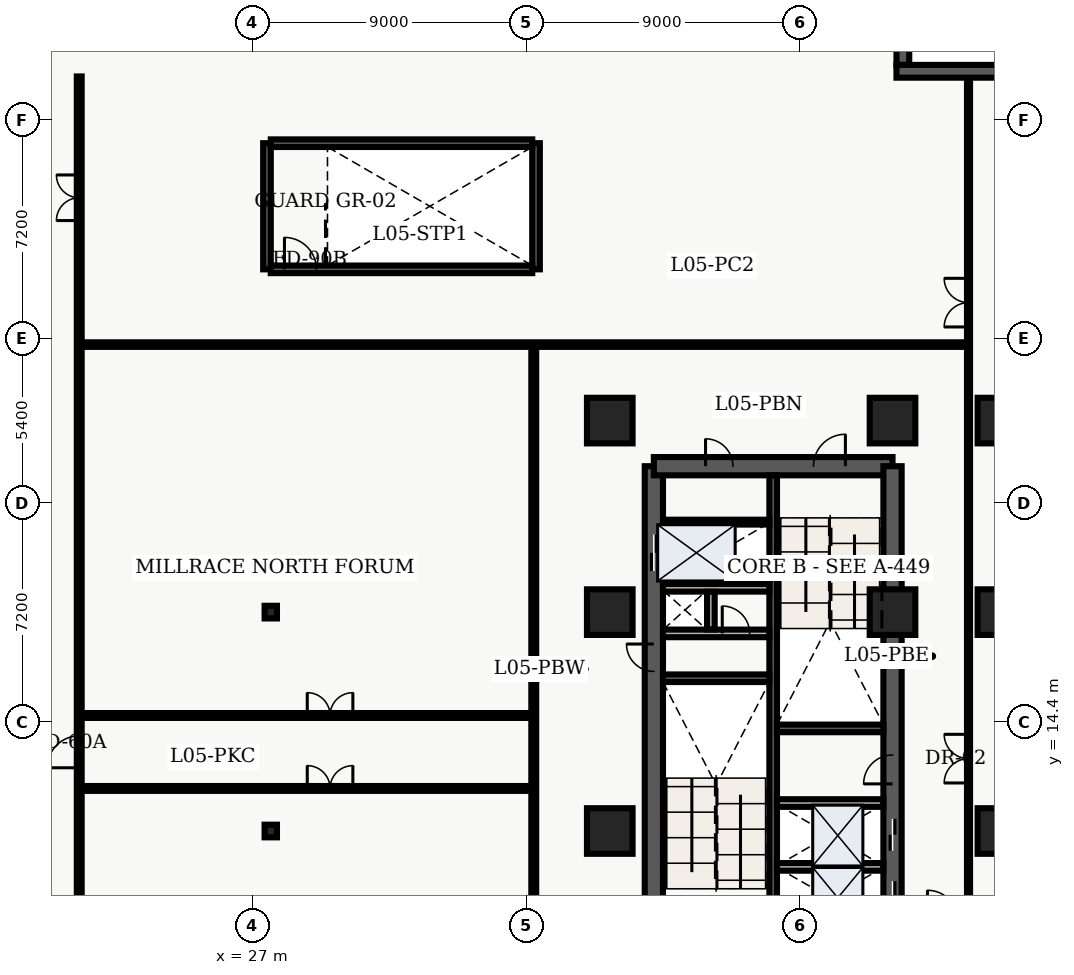
"""IFC4 building model, lengths in metres.
Left out: names, types, materials, properties, quantities, classifications, styles, units other than length and angle.
Written with IfcOpenShell. Run it as: python <this file> out.ifc"""

import sys

from ifc_helpers import new_model, entity, si_unit, converted_unit, direction, frame, origin_with_axes, origin_2d_with_axis, place, context, subcontext, project, spatial, polyline, rectangle, i_section, outline, extrude, element, fill, save


model = new_model("IFC4")
c1 = context("Model", 3, precision=1e-05, world=origin_with_axes(), true_north=direction((0.0, 1.0)))
c2 = subcontext(c1, "Body", "Model", "MODEL_VIEW")
j1 = project(units=[si_unit("LENGTHUNIT", "METRE"), converted_unit("PLANEANGLEUNIT", "DEGREE", entity("IfcPlaneAngleMeasure", 0.017), si_unit("PLANEANGLEUNIT", "RADIAN"), dimensions=[0, 0, 0, 0, 0, 0, 0])], contexts=[c1])
p1 = place(None, origin_with_axes())
s1 = spatial("IfcSite", under=j1, at=p1, CompositionType="ELEMENT")
p2 = place(p1, origin_with_axes())
s2 = spatial("IfcBuilding", under=s1, at=p2, CompositionType="ELEMENT")
p3 = place(p2, frame((0.0, 0.0, 24.3), z_axis=(0.0, 0.0, 1.0), x_axis=(1.0, 0.0, 0.0)))
s3 = spatial("IfcBuildingStorey", under=s2, at=p3, CompositionType="ELEMENT", Elevation=24.3)
p4 = place(p3, frame((40.2, 7.2, 0.0), z_axis=(0.0, 0.0, 1.0), x_axis=(0.0, 1.0, 0.0)))
e1 = element("IfcWall", 1, at=p4, inside=s3, PredefinedType="SHEAR", context=c2, shape_type="SweptSolid", body=[
    extrude(outline(polyline([(0.0, -0.3), (15.6, -0.3), (15.6, 0.3), (0.0, 0.3), (0.0, -0.3)])), origin_with_axes(), (0.0, 0.0, 1.0), 4.2),
])
p5 = place(p4, frame((12.75, 0.0, 0.0), z_axis=(0.0, 0.0, 1.0), x_axis=(1.0, 0.0, 0.0)))
e2 = element("IfcOpeningElement", 2, at=p5, cuts=e1, PredefinedType="OPENING", context=c2, shape_type="SweptSolid", body=[
    extrude(rectangle(XDim=1.2, YDim=0.62, at=origin_2d_with_axis()), origin_with_axes(), (0.0, 0.0, 1.0), 2.15),
])
p6 = place(p4, frame((9.3, 0.0, 0.0), z_axis=(0.0, 0.0, 1.0), x_axis=(1.0, 0.0, 0.0)))
e3 = element("IfcOpeningElement", 3, at=p6, cuts=e1, PredefinedType="OPENING", context=c2, shape_type="SweptSolid", body=[
    extrude(rectangle(XDim=0.9, YDim=0.62, at=origin_2d_with_axis()), origin_with_axes(), (0.0, 0.0, 1.0), 2.15),
])
p7 = place(p3, frame((40.2, 22.8, 0.0), z_axis=(0.0, 0.0, 1.0), x_axis=(1.0, 0.0, 0.0)))
e4 = element("IfcWall", 4, at=p7, inside=s3, PredefinedType="SHEAR", context=c2, shape_type="SweptSolid", body=[
    extrude(outline(polyline([(0.0, -0.3), (7.85, -0.3), (7.85, 0.3), (0.0, 0.3), (0.0, -0.3)])), origin_with_axes(), (0.0, 0.0, 1.0), 4.2),
])
p8 = place(p7, frame((5.775, 0.0, 0.0), z_axis=(0.0, 0.0, 1.0), x_axis=(1.0, 0.0, 0.0)))
e5 = element("IfcOpeningElement", 5, at=p8, cuts=e4, PredefinedType="OPENING", context=c2, shape_type="SweptSolid", body=[
    extrude(rectangle(XDim=1.05, YDim=0.62, at=origin_2d_with_axis()), origin_with_axes(), (0.0, 0.0, 1.0), 2.15),
])
p9 = place(p7, frame((2.15, 0.0, 0.0), z_axis=(0.0, 0.0, 1.0), x_axis=(1.0, 0.0, 0.0)))
e6 = element("IfcOpeningElement", 6, at=p9, cuts=e4, PredefinedType="OPENING", context=c2, shape_type="SweptSolid", body=[
    extrude(rectangle(XDim=0.9, YDim=0.62, at=origin_2d_with_axis()), origin_with_axes(), (0.0, 0.0, 1.0), 2.15),
])
p10 = place(p3, frame((48.05, 7.2, 0.0), z_axis=(0.0, 0.0, 1.0), x_axis=(0.0, 1.0, 0.0)))
e7 = element("IfcWall", 7, at=p10, inside=s3, PredefinedType="SHEAR", context=c2, shape_type="SweptSolid", body=[
    extrude(outline(polyline([(0.0, -0.3), (15.6, -0.3), (15.6, 0.3), (0.0, 0.3), (0.0, -0.3)])), origin_with_axes(), (0.0, 0.0, 1.0), 4.2),
])
p11 = place(p10, frame((1.425, 0.0, 0.0), z_axis=(0.0, 0.0, 1.0), x_axis=(1.0, 0.0, 0.0)))
e8 = element("IfcOpeningElement", 8, at=p11, cuts=e7, PredefinedType="OPENING", context=c2, shape_type="SweptSolid", body=[
    extrude(rectangle(XDim=1.05, YDim=0.62, at=origin_2d_with_axis()), origin_with_axes(), (0.0, 0.0, 1.0), 2.15),
])
p12 = place(p10, frame((3.475, 0.0, 0.0), z_axis=(0.0, 0.0, 1.0), x_axis=(1.0, 0.0, 0.0)))
e9 = element("IfcOpeningElement", 9, at=p12, cuts=e7, PredefinedType="OPENING", context=c2, shape_type="SweptSolid", body=[
    extrude(rectangle(XDim=1.05, YDim=0.62, at=origin_2d_with_axis()), origin_with_axes(), (0.0, 0.0, 1.0), 2.15),
])
p13 = place(p10, frame((5.625, 0.0, 0.0), z_axis=(0.0, 0.0, 1.0), x_axis=(1.0, 0.0, 0.0)))
e10 = element("IfcOpeningElement", 10, at=p13, cuts=e7, PredefinedType="OPENING", context=c2, shape_type="SweptSolid", body=[
    extrude(rectangle(XDim=0.95, YDim=0.62, at=origin_2d_with_axis()), origin_with_axes(), (0.0, 0.0, 1.0), 2.15),
])
p14 = place(p3, frame((44.125, 7.5, 0.0), z_axis=(0.0, 0.0, 1.0), x_axis=(0.0, 1.0, 0.0)))
e11 = element("IfcWall", 11, at=p14, inside=s3, PredefinedType="SHEAR", context=c2, shape_type="SweptSolid", body=[
    extrude(outline(polyline([(0.0, -0.125), (15.0, -0.125), (15.0, 0.125), (0.0, 0.125), (0.0, -0.125)])), origin_with_axes(), (0.0, 0.0, 1.0), 4.2),
])
for number, where, z_axis, x_axis in (
    (12, (40.5, 15.825, 0.0), (0.0, 0.0, 1.0), (1.0, 0.0, 0.0)),
    (13, (44.25, 14.175, 0.0), (0.0, 0.0, 1.0), (1.0, 0.0, 0.0)),
):
    element("IfcWall", number, at=place(p3, frame(where, z_axis=z_axis, x_axis=x_axis)), inside=s3, PredefinedType="SHEAR", context=c2, shape_type="SweptSolid", body=[
        extrude(outline(polyline([(0.0, -0.125), (3.5, -0.125), (3.5, 0.125), (0.0, 0.125), (0.0, -0.125)])), origin_with_axes(), (0.0, 0.0, 1.0), 4.2),
    ])
p15 = place(p3, frame((40.5, 17.3, 0.0), z_axis=(0.0, 0.0, 1.0), x_axis=(1.0, 0.0, 0.0)))
e14 = element("IfcWall", 14, at=p15, inside=s3, PredefinedType="SOLIDWALL", context=c2, shape_type="SweptSolid", body=[
    extrude(outline(polyline([(0.0, -0.125), (3.5, -0.125), (3.5, 0.125), (0.0, 0.125), (0.0, -0.125)])), origin_with_axes(), (0.0, 0.0, 1.0), 3.24),
])
p16 = place(p15, frame((2.4, 0.0, 0.0), z_axis=(0.0, 0.0, 1.0), x_axis=(1.0, 0.0, 0.0)))
e15 = element("IfcOpeningElement", 15, at=p16, cuts=e14, PredefinedType="OPENING", context=c2, shape_type="SweptSolid", body=[
    extrude(rectangle(XDim=0.9, YDim=0.27, at=origin_2d_with_axis()), origin_with_axes(), (0.0, 0.0, 1.0), 2.15),
])
p17 = place(p3, frame((40.5, 18.8, 0.0), z_axis=(0.0, 0.0, 1.0), x_axis=(1.0, 0.0, 0.0)))
e16 = element("IfcWall", 16, at=p17, inside=s3, PredefinedType="SOLIDWALL", context=c2, shape_type="SweptSolid", body=[
    extrude(outline(polyline([(0.0, -0.125), (3.5, -0.125), (3.5, 0.125), (0.0, 0.125), (0.0, -0.125)])), origin_with_axes(), (0.0, 0.0, 1.0), 3.24),
])
p18 = place(p3, frame((42.075, 17.43, 0.0), z_axis=(0.0, 0.0, 1.0), x_axis=(0.0, 1.0, 0.0)))
e17 = element("IfcWall", 17, at=p18, inside=s3, PredefinedType="SOLIDWALL", context=c2, shape_type="SweptSolid", body=[
    extrude(outline(polyline([(0.0, -0.125), (1.24, -0.125), (1.24, 0.125), (0.0, 0.125), (0.0, -0.125)])), origin_with_axes(), (0.0, 0.0, 1.0), 3.24),
])
for number, where, z_axis, x_axis in (
    (18, (27.475, 29.275, 0.0), (0.0, 0.0, 1.0), (0.0, 1.0, 0.0)),
    (19, (36.325, 29.275, 0.0), (0.0, 0.0, 1.0), (0.0, 1.0, 0.0)),
):
    element("IfcWall", number, at=place(p3, frame(where, z_axis=z_axis, x_axis=x_axis)), inside=s3, PredefinedType="SHEAR", context=c2, shape_type="SweptSolid", body=[
        extrude(outline(polyline([(0.0, -0.125), (4.15, -0.125), (4.15, 0.125), (0.0, 0.125), (0.0, -0.125)])), origin_with_axes(), (0.0, 0.0, 1.0), 4.2),
    ])
p19 = place(p3, frame((27.6, 29.275, 0.0), z_axis=(0.0, 0.0, 1.0), x_axis=(1.0, 0.0, 0.0)))
e20 = element("IfcWall", 20, at=p19, inside=s3, PredefinedType="SHEAR", context=c2, shape_type="SweptSolid", body=[
    extrude(outline(polyline([(0.0, -0.125), (8.6, -0.125), (8.6, 0.125), (0.0, 0.125), (0.0, -0.125)])), origin_with_axes(), (0.0, 0.0, 1.0), 4.2),
])
p20 = place(p19, frame((0.975, 0.0, 0.0), z_axis=(0.0, 0.0, 1.0), x_axis=(1.0, 0.0, 0.0)))
e21 = element("IfcOpeningElement", 21, at=p20, cuts=e20, PredefinedType="OPENING", context=c2, shape_type="SweptSolid", body=[
    extrude(rectangle(XDim=1.05, YDim=0.27, at=origin_2d_with_axis()), origin_with_axes(), (0.0, 0.0, 1.0), 2.15),
])
p21 = place(p3, frame((27.6, 33.425, 0.0), z_axis=(0.0, 0.0, 1.0), x_axis=(1.0, 0.0, 0.0)))
e22 = element("IfcWall", 22, at=p21, inside=s3, PredefinedType="SHEAR", context=c2, shape_type="SweptSolid", body=[
    extrude(outline(polyline([(0.0, -0.125), (8.6, -0.125), (8.6, 0.125), (0.0, 0.125), (0.0, -0.125)])), origin_with_axes(), (0.0, 0.0, 1.0), 4.2),
])
for number, where, z_axis, x_axis in (
    (23, (27.6, 10.8, 0.0), (0.0, 0.0, 1.0), (1.0, 0.0, 0.0)),
    (24, (27.6, 18.0, 0.0), (0.0, 0.0, 1.0), (1.0, 0.0, 0.0)),
):
    element("IfcColumn", number, at=place(p3, frame(where, z_axis=z_axis, x_axis=x_axis)), inside=s3, PredefinedType="COLUMN", context=c2, shape_type="SweptSolid", body=[
        extrude(i_section(OverallWidth=0.406, OverallDepth=0.416, WebThickness=0.03, FlangeThickness=0.048, FilletRadius=0.022, at=origin_2d_with_axis()), origin_with_axes(), (0.0, 0.0, 1.0), 4.5),
    ])
for number, where, z_axis, x_axis in (
    (25, (38.75, 10.8, 0.0), (0.0, 0.0, 1.0), (1.0, 0.0, 0.0)),
    (26, (38.75, 18.0, 0.0), (0.0, 0.0, 1.0), (1.0, 0.0, 0.0)),
    (27, (38.75, 24.3, 0.0), (0.0, 0.0, 1.0), (1.0, 0.0, 0.0)),
    (28, (48.05, 18.0, 0.0), (0.0, 0.0, 1.0), (1.0, 0.0, 0.0)),
    (29, (48.05, 24.3, 0.0), (0.0, 0.0, 1.0), (1.0, 0.0, 0.0)),
    (30, (51.6, 10.8, 0.0), (0.0, 0.0, 1.0), (1.0, 0.0, 0.0)),
    (31, (51.6, 18.0, 0.0), (0.0, 0.0, 1.0), (1.0, 0.0, 0.0)),
    (32, (51.6, 24.3, 0.0), (0.0, 0.0, 1.0), (1.0, 0.0, 0.0)),
):
    element("IfcColumn", number, at=place(p3, frame(where, z_axis=z_axis, x_axis=x_axis)), inside=s3, PredefinedType="COLUMN", context=c2, shape_type="SweptSolid", body=[
        extrude(rectangle(XDim=1.5, YDim=1.5, at=origin_2d_with_axis()), origin_with_axes(), (0.0, 0.0, 1.0), 4.5),
    ])
p22 = place(p3, frame((40.5, 20.96, 0.0), z_axis=(0.0, 0.0, 1.0), x_axis=(1.0, 0.0, 0.0)))
e33 = element("IfcWall", 33, at=p22, inside=s3, PredefinedType="PARTITIONING", context=c2, shape_type="SweptSolid", body=[
    extrude(outline(polyline([(0.0, -0.08), (3.5, -0.08), (3.5, 0.08), (0.0, 0.08), (0.0, -0.08)])), origin_with_axes(), (0.0, 0.0, 1.0), 3.2),
])
for number, where, z_axis, x_axis in (
    (34, (44.25, 9.62, 0.0), (0.0, 0.0, 1.0), (1.0, 0.0, 0.0)),
    (35, (44.25, 11.72, 0.0), (0.0, 0.0, 1.0), (1.0, 0.0, 0.0)),
):
    element("IfcWall", number, at=place(p3, frame(where, z_axis=z_axis, x_axis=x_axis)), inside=s3, PredefinedType="SOLIDWALL", context=c2, shape_type="SweptSolid", body=[
        extrude(outline(polyline([(0.0, -0.125), (3.5, -0.125), (3.5, 0.125), (0.0, 0.125), (0.0, -0.125)])), origin_with_axes(), (0.0, 0.0, 1.0), 3.2),
    ])
p23 = place(p3, frame((21.3, 0.38, 0.0), z_axis=(0.0, 0.0, 1.0), x_axis=(0.0, 1.0, 0.0)))
e36 = element("IfcWall", 36, at=p23, inside=s3, PredefinedType="PARTITIONING", context=c2, shape_type="SweptSolid", body=[
    extrude(outline(polyline([(0.0, -0.08), (35.24, -0.08), (35.24, 0.08), (0.0, 0.08), (0.0, -0.08)])), origin_with_axes(), (0.0, 0.0, 1.0), 3.2),
])
p24 = place(p23, frame((13.025, 0.0, 0.0), z_axis=(0.0, 0.0, 1.0), x_axis=(1.0, 0.0, 0.0)))
e37 = element("IfcOpeningElement", 37, at=p24, cuts=e36, PredefinedType="OPENING", context=c2, shape_type="SweptSolid", body=[
    extrude(rectangle(XDim=1.05, YDim=0.18, at=origin_2d_with_axis()), origin_with_axes(), (0.0, 0.0, 1.0), 2.15),
])
p25 = place(p23, frame((31.25, 0.0, 0.0), z_axis=(0.0, 0.0, 1.0), x_axis=(1.0, 0.0, 0.0)))
e38 = element("IfcOpeningElement", 38, at=p25, cuts=e36, PredefinedType="OPENING", context=c2, shape_type="SweptSolid", body=[
    extrude(rectangle(XDim=1.5, YDim=0.18, at=origin_2d_with_axis()), origin_with_axes(), (0.0, 0.0, 1.0), 2.2),
])
p26 = place(p3, frame((21.3, 12.2, 0.0), z_axis=(0.0, 0.0, 1.0), x_axis=(1.0, 0.0, 0.0)))
e39 = element("IfcWall", 39, at=p26, inside=s3, PredefinedType="PARTITIONING", context=c2, shape_type="SweptSolid", body=[
    extrude(outline(polyline([(0.0, -0.08), (14.95, -0.08), (14.95, 0.08), (0.0, 0.08), (0.0, -0.08)])), origin_with_axes(), (0.0, 0.0, 1.0), 3.2),
])
p27 = place(p26, frame((8.25, 0.0, 0.0), z_axis=(0.0, 0.0, 1.0), x_axis=(1.0, 0.0, 0.0)))
e40 = element("IfcOpeningElement", 40, at=p27, cuts=e39, PredefinedType="OPENING", context=c2, shape_type="SweptSolid", body=[
    extrude(rectangle(XDim=1.5, YDim=0.18, at=origin_2d_with_axis()), origin_with_axes(), (0.0, 0.0, 1.0), 2.2),
])
p28 = place(p3, frame((21.3, 14.6, 0.0), z_axis=(0.0, 0.0, 1.0), x_axis=(1.0, 0.0, 0.0)))
e41 = element("IfcWall", 41, at=p28, inside=s3, PredefinedType="PARTITIONING", context=c2, shape_type="SweptSolid", body=[
    extrude(outline(polyline([(0.0, -0.08), (14.95, -0.08), (14.95, 0.08), (0.0, 0.08), (0.0, -0.08)])), origin_with_axes(), (0.0, 0.0, 1.0), 3.2),
])
p29 = place(p28, frame((8.25, 0.0, 0.0), z_axis=(0.0, 0.0, 1.0), x_axis=(1.0, 0.0, 0.0)))
e42 = element("IfcOpeningElement", 42, at=p29, cuts=e41, PredefinedType="OPENING", context=c2, shape_type="SweptSolid", body=[
    extrude(rectangle(XDim=1.5, YDim=0.18, at=origin_2d_with_axis()), origin_with_axes(), (0.0, 0.0, 1.0), 2.2),
])
p30 = place(p3, frame((36.25, 4.3, 0.0), z_axis=(0.0, 0.0, 1.0), x_axis=(0.0, 1.0, 0.0)))
e43 = element("IfcWall", 43, at=p30, inside=s3, PredefinedType="PARTITIONING", context=c2, shape_type="SweptSolid", body=[
    extrude(outline(polyline([(0.0, -0.08), (22.5, -0.08), (22.5, 0.08), (0.0, 0.08), (0.0, -0.08)])), origin_with_axes(), (0.0, 0.0, 1.0), 3.2),
])
p31 = place(p3, frame((50.55, 0.38, 0.0), z_axis=(0.0, 0.0, 1.0), x_axis=(0.0, 1.0, 0.0)))
e44 = element("IfcWall", 44, at=p31, inside=s3, PredefinedType="PARTITIONING", context=c2, shape_type="SweptSolid", body=[
    extrude(outline(polyline([(0.0, -0.05), (35.24, -0.05), (35.24, 0.05), (0.0, 0.05), (0.0, -0.05)])), origin_with_axes(), (0.0, 0.0, 1.0), 3.2),
])
p32 = place(p31, frame((12.8, 0.0, 0.0), z_axis=(0.0, 0.0, 1.0), x_axis=(1.0, 0.0, 0.0)))
e45 = element("IfcOpeningElement", 45, at=p32, cuts=e44, PredefinedType="OPENING", context=c2, shape_type="SweptSolid", body=[
    extrude(rectangle(XDim=1.6, YDim=0.12, at=origin_2d_with_axis()), origin_with_axes(), (0.0, 0.0, 1.0), 2.2),
])
p33 = place(p31, frame((27.8, 0.0, 0.0), z_axis=(0.0, 0.0, 1.0), x_axis=(1.0, 0.0, 0.0)))
e46 = element("IfcOpeningElement", 46, at=p33, cuts=e44, PredefinedType="OPENING", context=c2, shape_type="SweptSolid", body=[
    extrude(rectangle(XDim=1.6, YDim=0.12, at=origin_2d_with_axis()), origin_with_axes(), (0.0, 0.0, 1.0), 2.2),
])
p34 = place(p3, frame((21.3, 26.8, 0.0), z_axis=(0.0, 0.0, 1.0), x_axis=(1.0, 0.0, 0.0)))
e47 = element("IfcWall", 47, at=p34, inside=s3, PredefinedType="PARTITIONING", context=c2, shape_type="SweptSolid", body=[
    extrude(outline(polyline([(0.0, -0.075), (29.25, -0.075), (29.25, 0.075), (0.0, 0.075), (0.0, -0.075)])), origin_with_axes(), (0.0, 0.0, 1.0), 3.2),
])
p35 = place(p3, frame((48.39, 39.3, 0.0), z_axis=(0.0, 0.0, 1.0), x_axis=(0.0, -1.0, 0.0)))
e48 = element("IfcWall", 48, at=p35, inside=s3, PredefinedType="SOLIDWALL", context=c2, shape_type="SweptSolid", body=[
    extrude(outline(polyline([(0.0, -0.21), (3.3, -0.21), (3.3, 0.21), (0.0, 0.21), (0.0, -0.21)])), origin_with_axes(), (0.0, 0.0, 1.0), 4.2),
])
p36 = place(p3, frame((48.18, 35.79, 0.0), z_axis=(0.0, 0.0, 1.0), x_axis=(1.0, 0.0, 0.0)))
e49 = element("IfcWall", 49, at=p36, inside=s3, PredefinedType="SOLIDWALL", context=c2, shape_type="SweptSolid", body=[
    extrude(outline(polyline([(0.0, -0.21), (5.52, -0.21), (5.52, 0.21), (0.0, 0.21), (0.0, -0.21)])), origin_with_axes(), (0.0, 0.0, 1.0), 4.2),
])
p37 = place(p10, frame((1.425, 0.0, 0.0), z_axis=(0.0, 0.0, 1.0), x_axis=(1.0, 0.0, 0.0)))
e50 = element("IfcDoor", 50, at=p37, inside=s3, OperationType="SLIDING_TO_LEFT", PredefinedType="DOOR", context=c2, shape_type="SweptSolid", body=[
    extrude(rectangle(XDim=1.05, YDim=0.09, at=origin_2d_with_axis()), origin_with_axes(), (0.0, 0.0, 1.0), 2.15),
])
fill(e8, e50)
p38 = place(p10, frame((3.475, 0.0, 0.0), z_axis=(0.0, 0.0, 1.0), x_axis=(1.0, 0.0, 0.0)))
e51 = element("IfcDoor", 51, at=p38, inside=s3, OperationType="SLIDING_TO_RIGHT", PredefinedType="DOOR", context=c2, shape_type="SweptSolid", body=[
    extrude(rectangle(XDim=1.05, YDim=0.09, at=origin_2d_with_axis()), origin_with_axes(), (0.0, 0.0, 1.0), 2.15),
])
fill(e9, e51)
p39 = place(p4, frame((12.75, 0.0, 0.0), z_axis=(0.0, 0.0, 1.0), x_axis=(1.0, 0.0, 0.0)))
e52 = element("IfcDoor", 52, at=p39, inside=s3, OperationType="DOUBLE_DOOR_SLIDING", PredefinedType="DOOR", context=c2, shape_type="SweptSolid", body=[
    extrude(rectangle(XDim=1.2, YDim=0.09, at=origin_2d_with_axis()), origin_with_axes(), (0.0, 0.0, 1.0), 2.15),
])
fill(e2, e52)
p40 = place(p4, frame((9.3, 0.0, 0.0), z_axis=(0.0, 0.0, 1.0), x_axis=(1.0, 0.0, 0.0)))
e53 = element("IfcDoor", 53, at=p40, inside=s3, OperationType="SINGLE_SWING_RIGHT", PredefinedType="DOOR", context=c2, shape_type="SweptSolid", body=[
    extrude(rectangle(XDim=0.9, YDim=0.09, at=origin_2d_with_axis()), origin_with_axes(), (0.0, 0.0, 1.0), 2.15),
])
fill(e3, e53)
p41 = place(p15, frame((2.4, 0.0, 0.0), z_axis=(0.0, 0.0, 1.0), x_axis=(1.0, 0.0, 0.0)))
e54 = element("IfcDoor", 54, at=p41, inside=s3, OperationType="SINGLE_SWING_LEFT", PredefinedType="DOOR", context=c2, shape_type="SweptSolid", body=[
    extrude(rectangle(XDim=0.9, YDim=0.09, at=origin_2d_with_axis()), origin_with_axes(), (0.0, 0.0, 1.0), 2.15),
])
fill(e15, e54)
p42 = place(p7, frame((5.775, 0.0, 0.0), z_axis=(0.0, 0.0, 1.0), x_axis=(1.0, 0.0, 0.0)))
e55 = element("IfcDoor", 55, at=p42, inside=s3, OperationType="SINGLE_SWING_RIGHT", PredefinedType="DOOR", context=c2, shape_type="SweptSolid", body=[
    extrude(rectangle(XDim=1.05, YDim=0.09, at=origin_2d_with_axis()), origin_with_axes(), (0.0, 0.0, 1.0), 2.15),
])
fill(e5, e55)
p43 = place(p7, frame((2.15, 0.0, 0.0), z_axis=(0.0, 0.0, 1.0), x_axis=(1.0, 0.0, 0.0)))
e56 = element("IfcDoor", 56, at=p43, inside=s3, OperationType="SINGLE_SWING_LEFT", PredefinedType="DOOR", context=c2, shape_type="SweptSolid", body=[
    extrude(rectangle(XDim=0.9, YDim=0.09, at=origin_2d_with_axis()), origin_with_axes(), (0.0, 0.0, 1.0), 2.15),
])
fill(e6, e56)
p44 = place(p10, frame((5.625, 0.0, 0.0), z_axis=(0.0, 0.0, 1.0), x_axis=(1.0, 0.0, 0.0)))
e57 = element("IfcDoor", 57, at=p44, inside=s3, OperationType="SINGLE_SWING_LEFT", PredefinedType="DOOR", context=c2, shape_type="SweptSolid", body=[
    extrude(rectangle(XDim=0.95, YDim=0.09, at=origin_2d_with_axis()), origin_with_axes(), (0.0, 0.0, 1.0), 2.15),
])
fill(e10, e57)
p45 = place(p19, frame((0.975, 0.0, 0.0), z_axis=(0.0, 0.0, 1.0), x_axis=(1.0, 0.0, 0.0)))
e58 = element("IfcDoor", 58, at=p45, inside=s3, OperationType="SINGLE_SWING_LEFT", PredefinedType="DOOR", context=c2, shape_type="SweptSolid", body=[
    extrude(rectangle(XDim=1.05, YDim=0.09, at=origin_2d_with_axis()), origin_with_axes(), (0.0, 0.0, 1.0), 2.15),
])
fill(e21, e58)
p46 = place(p23, frame((13.025, 0.0, 0.0), z_axis=(0.0, 0.0, 1.0), x_axis=(1.0, 0.0, 0.0)))
e59 = element("IfcDoor", 59, at=p46, inside=s3, OperationType="SINGLE_SWING_LEFT", PredefinedType="DOOR", context=c2, shape_type="SweptSolid", body=[
    extrude(rectangle(XDim=1.05, YDim=0.09, at=origin_2d_with_axis()), origin_with_axes(), (0.0, 0.0, 1.0), 2.15),
])
fill(e37, e59)
p47 = place(p26, frame((8.25, 0.0, 0.0), z_axis=(0.0, 0.0, 1.0), x_axis=(1.0, 0.0, 0.0)))
e60 = element("IfcDoor", 60, at=p47, inside=s3, OperationType="DOUBLE_DOOR_SINGLE_SWING", PredefinedType="DOOR", context=c2, shape_type="SweptSolid", body=[
    extrude(rectangle(XDim=1.5, YDim=0.09, at=origin_2d_with_axis()), origin_with_axes(), (0.0, 0.0, 1.0), 2.2),
])
fill(e40, e60)
p48 = place(p28, frame((8.25, 0.0, 0.0), z_axis=(0.0, 0.0, 1.0), x_axis=(1.0, 0.0, 0.0)))
e61 = element("IfcDoor", 61, at=p48, inside=s3, OperationType="DOUBLE_DOOR_SINGLE_SWING", PredefinedType="DOOR", context=c2, shape_type="SweptSolid", body=[
    extrude(rectangle(XDim=1.5, YDim=0.09, at=origin_2d_with_axis()), origin_with_axes(), (0.0, 0.0, 1.0), 2.2),
])
fill(e42, e61)
p49 = place(p23, frame((31.25, 0.0, 0.0), z_axis=(0.0, 0.0, 1.0), x_axis=(1.0, 0.0, 0.0)))
e62 = element("IfcDoor", 62, at=p49, inside=s3, OperationType="DOUBLE_DOOR_SINGLE_SWING", PredefinedType="DOOR", context=c2, shape_type="SweptSolid", body=[
    extrude(rectangle(XDim=1.5, YDim=0.09, at=origin_2d_with_axis()), origin_with_axes(), (0.0, 0.0, 1.0), 2.2),
])
fill(e38, e62)
p50 = place(p31, frame((12.8, 0.0, 0.0), z_axis=(0.0, 0.0, 1.0), x_axis=(1.0, 0.0, 0.0)))
e63 = element("IfcDoor", 63, at=p50, inside=s3, OperationType="DOUBLE_DOOR_SINGLE_SWING", PredefinedType="DOOR", context=c2, shape_type="SweptSolid", body=[
    extrude(rectangle(XDim=1.6, YDim=0.06, at=origin_2d_with_axis()), origin_with_axes(), (0.0, 0.0, 1.0), 2.2),
])
fill(e45, e63)
p51 = place(p31, frame((27.8, 0.0, 0.0), z_axis=(0.0, 0.0, 1.0), x_axis=(1.0, 0.0, 0.0)))
e64 = element("IfcDoor", 64, at=p51, inside=s3, OperationType="DOUBLE_DOOR_SINGLE_SWING", PredefinedType="DOOR", context=c2, shape_type="SweptSolid", body=[
    extrude(rectangle(XDim=1.6, YDim=0.06, at=origin_2d_with_axis()), origin_with_axes(), (0.0, 0.0, 1.0), 2.2),
])
fill(e46, e64)
save(model, sys.argv[1])
